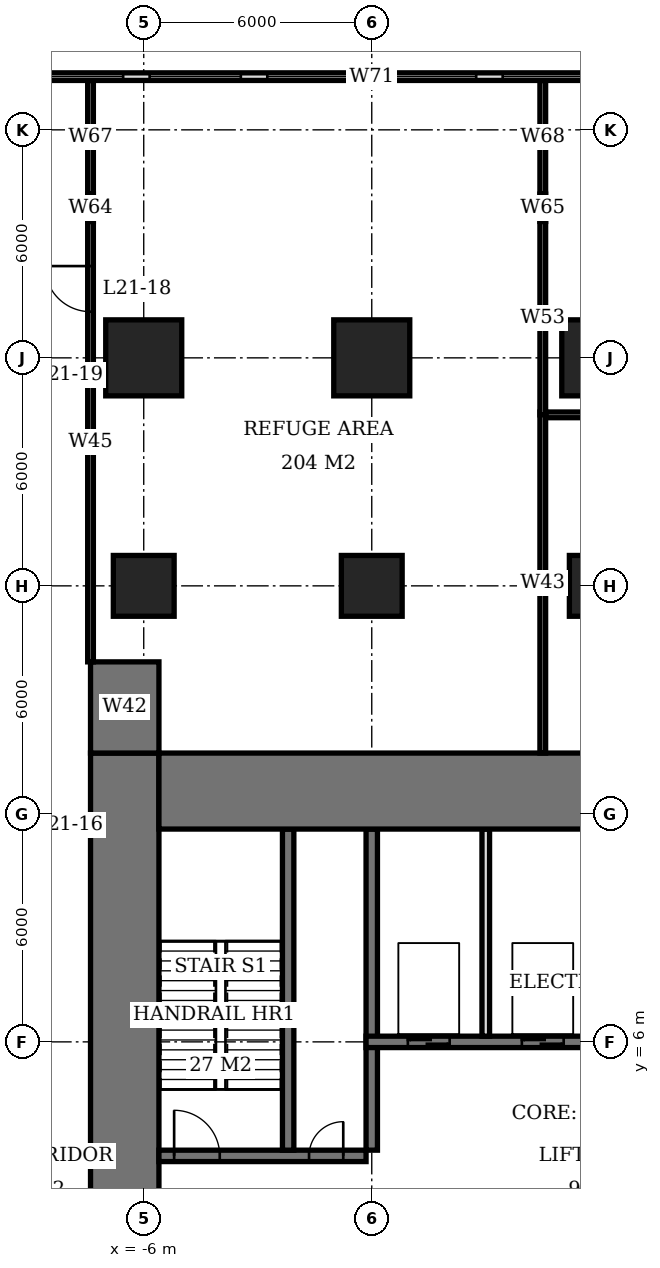
"""IFC4 building model, lengths in metres.
Left out: names, types, materials, properties, quantities, classifications, styles, units other than length and angle.
Written with IfcOpenShell. Run it as: python <this file> out.ifc"""

import sys

from ifc_helpers import new_model, si_unit, direction, frame, frame_2d, origin, origin_2d, place, context, subcontext, project, spatial, rectangle, extrude, element, fill, save


model = new_model("IFC4")
c1 = context("Model", 3, precision=1e-05, world=origin(), true_north=direction((0.0, 1.0)))
c2 = subcontext(c1, "Body", "Model", "MODEL_VIEW")
j1 = project(units=[si_unit("LENGTHUNIT", "METRE"), si_unit("PLANEANGLEUNIT", "RADIAN")], contexts=[c1])
p1 = place(None, origin())
s1 = spatial("IfcSite", under=j1, at=p1, CompositionType="ELEMENT")
p2 = place(p1, origin())
s2 = spatial("IfcBuilding", under=s1, at=p2, CompositionType="ELEMENT")
p3 = place(p2, frame((0.0, 0.0, 88.4)))
s3 = spatial("IfcBuildingStorey", under=s2, at=p3, CompositionType="ELEMENT", Elevation=88.4)
p4 = place(p3, frame((-6.0, 18.0, 0.0), z_axis=(0.0, 0.0, 1.0), x_axis=(1.0, 0.0, 0.0)))
e1 = element("IfcColumn", 1, at=p4, inside=s3, PredefinedType="COLUMN", context=c2, shape_type="SweptSolid", body=[
    extrude(rectangle(XDim=1.6, YDim=1.6, at=origin_2d()), origin(), (0.0, 0.0, 1.0), 5.4),
])
p5 = place(p3, frame((-6.0, 24.0, 0.0), z_axis=(0.0, 0.0, 1.0), x_axis=(1.0, 0.0, 0.0)))
e2 = element("IfcColumn", 2, at=p5, inside=s3, PredefinedType="COLUMN", context=c2, shape_type="SweptSolid", body=[
    extrude(rectangle(XDim=2.0, YDim=2.0, at=origin_2d()), origin(), (0.0, 0.0, 1.0), 5.4),
])
p6 = place(p3, frame((0.0, 18.0, 0.0), z_axis=(0.0, 0.0, 1.0), x_axis=(1.0, 0.0, 0.0)))
e3 = element("IfcColumn", 3, at=p6, inside=s3, PredefinedType="COLUMN", context=c2, shape_type="SweptSolid", body=[
    extrude(rectangle(XDim=1.6, YDim=1.6, at=origin_2d()), origin(), (0.0, 0.0, 1.0), 5.4),
])
p7 = place(p3, frame((0.0, 24.0, 0.0), z_axis=(0.0, 0.0, 1.0), x_axis=(1.0, 0.0, 0.0)))
e4 = element("IfcColumn", 4, at=p7, inside=s3, PredefinedType="COLUMN", context=c2, shape_type="SweptSolid", body=[
    extrude(rectangle(XDim=2.0, YDim=2.0, at=origin_2d()), origin(), (0.0, 0.0, 1.0), 5.4),
])
p8 = place(p3, frame((6.0, 18.0, 0.0), z_axis=(0.0, 0.0, 1.0), x_axis=(1.0, 0.0, 0.0)))
e5 = element("IfcColumn", 5, at=p8, inside=s3, PredefinedType="COLUMN", context=c2, shape_type="SweptSolid", body=[
    extrude(rectangle(XDim=1.6, YDim=1.6, at=origin_2d()), origin(), (0.0, 0.0, 1.0), 5.4),
])
p9 = place(p3, frame((6.0, 24.0, 0.0), z_axis=(0.0, 0.0, 1.0), x_axis=(1.0, 0.0, 0.0)))
e6 = element("IfcColumn", 6, at=p9, inside=s3, PredefinedType="COLUMN", context=c2, shape_type="SweptSolid", body=[
    extrude(rectangle(XDim=2.0, YDim=2.0, at=origin_2d()), origin(), (0.0, 0.0, 1.0), 5.4),
])
p10 = place(p3, frame((-5.6, 12.6, 0.0), z_axis=(0.0, 0.0, 1.0), x_axis=(1.0, 0.0, 0.0)))
e7 = element("IfcWall", 7, at=p10, inside=s3, PredefinedType="SHEAR", context=c2, shape_type="SweptSolid", body=[
    extrude(rectangle(XDim=23.2, YDim=2.0, at=frame_2d((11.6, 0.0))), origin(), (0.0, 0.0, 1.0), 5.4),
])
p11 = place(p3, frame((-6.5, -7.6, 0.0), z_axis=(0.0, 0.0, 1.0), x_axis=(0.0, 1.0, 0.0)))
e8 = element("IfcWall", 8, at=p11, inside=s3, PredefinedType="SHEAR", context=c2, shape_type="SweptSolid", body=[
    extrude(rectangle(XDim=21.2, YDim=1.8, at=frame_2d((10.6, 0.0))), origin(), (0.0, 0.0, 1.0), 5.4),
])
p12 = place(p11, frame((7.8, 0.0, 0.0)))
e9 = element("IfcOpeningElement", 9, at=p12, cuts=e8, PredefinedType="OPENING", context=c2, shape_type="SweptSolid", body=[
    extrude(rectangle(XDim=1.8, YDim=2.4, at=frame_2d((0.9, 1.2))), frame((0.0, 0.91, 0.0), z_axis=(0.0, -1.0, 0.0), x_axis=(1.0, 0.0, 0.0)), (0.0, 0.0, 1.0), 1.82),
])
p13 = place(p3, frame((-6.5, 13.6, 0.0), z_axis=(0.0, 0.0, 1.0), x_axis=(0.0, 1.0, 0.0)))
e10 = element("IfcWall", 10, at=p13, inside=s3, PredefinedType="SHEAR", context=c2, shape_type="SweptSolid", body=[
    extrude(rectangle(XDim=2.4, YDim=1.8, at=frame_2d((1.2, 0.0))), origin(), (0.0, 0.0, 1.0), 5.4),
])
p14 = place(p3, frame((-5.6, 3.0, 0.0), z_axis=(0.0, 0.0, 1.0), x_axis=(1.0, 0.0, 0.0)))
e11 = element("IfcWall", 11, at=p14, inside=s3, PredefinedType="SHEAR", context=c2, shape_type="SweptSolid", body=[
    extrude(rectangle(XDim=5.45, YDim=0.3, at=frame_2d((2.725, 0.0))), origin(), (0.0, 0.0, 1.0), 5.4),
])
p15 = place(p14, frame((0.4, 0.0, 0.0)))
e12 = element("IfcOpeningElement", 12, at=p15, cuts=e11, PredefinedType="OPENING", context=c2, shape_type="SweptSolid", body=[
    extrude(rectangle(XDim=1.2, YDim=2.1, at=frame_2d((0.6, 1.05))), frame((0.0, 0.16, 0.0), z_axis=(0.0, -1.0, 0.0), x_axis=(1.0, 0.0, 0.0)), (0.0, 0.0, 1.0), 0.32),
])
p16 = place(p14, frame((3.95, 0.0, 0.0)))
e13 = element("IfcOpeningElement", 13, at=p16, cuts=e11, PredefinedType="OPENING", context=c2, shape_type="SweptSolid", body=[
    extrude(rectangle(XDim=0.9, YDim=2.1, at=frame_2d((0.45, 1.05))), frame((0.0, 0.16, 0.0), z_axis=(0.0, -1.0, 0.0), x_axis=(1.0, 0.0, 0.0)), (0.0, 0.0, 1.0), 0.32),
])
p17 = place(p3, frame((-0.15, 6.0, 0.0), z_axis=(0.0, 0.0, 1.0), x_axis=(1.0, 0.0, 0.0)))
e14 = element("IfcWall", 14, at=p17, inside=s3, PredefinedType="SHEAR", context=c2, shape_type="SweptSolid", body=[
    extrude(rectangle(XDim=17.75, YDim=0.3, at=frame_2d((8.875, 0.0))), origin(), (0.0, 0.0, 1.0), 5.4),
])
p18 = place(p17, frame((13.15, 0.0, 0.0)))
e15 = element("IfcOpeningElement", 15, at=p18, cuts=e14, PredefinedType="OPENING", context=c2, shape_type="SweptSolid", body=[
    extrude(rectangle(XDim=0.9, YDim=2.1, at=frame_2d((0.45, 1.05))), frame((0.0, 0.16, 0.0), z_axis=(0.0, -1.0, 0.0), x_axis=(1.0, 0.0, 0.0)), (0.0, 0.0, 1.0), 0.32),
])
p19 = place(p17, frame((16.25, 0.0, 0.0)))
e16 = element("IfcOpeningElement", 16, at=p19, cuts=e14, PredefinedType="OPENING", context=c2, shape_type="SweptSolid", body=[
    extrude(rectangle(XDim=1.0, YDim=2.1, at=frame_2d((0.5, 1.05))), frame((0.0, 0.16, 0.0), z_axis=(0.0, -1.0, 0.0), x_axis=(1.0, 0.0, 0.0)), (0.0, 0.0, 1.0), 0.32),
])
p20 = place(p17, frame((7.25, 0.0, 0.0)))
e17 = element("IfcOpeningElement", 17, at=p20, cuts=e14, PredefinedType="OPENING", context=c2, shape_type="SweptSolid", body=[
    extrude(rectangle(XDim=1.0, YDim=2.1, at=frame_2d((0.5, 1.05))), frame((0.0, 0.16, 0.0), z_axis=(0.0, -1.0, 0.0), x_axis=(1.0, 0.0, 0.0)), (0.0, 0.0, 1.0), 0.32),
])
p21 = place(p17, frame((1.1, 0.0, 0.0)))
e18 = element("IfcOpeningElement", 18, at=p21, cuts=e14, PredefinedType="OPENING", context=c2, shape_type="SweptSolid", body=[
    extrude(rectangle(XDim=1.1, YDim=2.1, at=frame_2d((0.55, 1.05))), frame((0.0, 0.16, 0.0), z_axis=(0.0, -1.0, 0.0), x_axis=(1.0, 0.0, 0.0)), (0.0, 0.0, 1.0), 0.32),
])
p22 = place(p17, frame((4.1, 0.0, 0.0)))
e19 = element("IfcOpeningElement", 19, at=p22, cuts=e14, PredefinedType="OPENING", context=c2, shape_type="SweptSolid", body=[
    extrude(rectangle(XDim=1.1, YDim=2.1, at=frame_2d((0.55, 1.05))), frame((0.0, 0.16, 0.0), z_axis=(0.0, -1.0, 0.0), x_axis=(1.0, 0.0, 0.0)), (0.0, 0.0, 1.0), 0.32),
])
for number, where, z_axis, x_axis in (
    (20, (0.0, 3.15, 0.0), (0.0, 0.0, 1.0), (0.0, 1.0, 0.0)),
    (21, (-2.2, 3.15, 0.0), (0.0, 0.0, 1.0), (0.0, 1.0, 0.0)),
):
    element("IfcWall", number, at=place(p3, frame(where, z_axis=z_axis, x_axis=x_axis)), inside=s3, PredefinedType="SHEAR", context=c2, shape_type="SweptSolid", body=[
        extrude(rectangle(XDim=8.45, YDim=0.3, at=frame_2d((4.225, 0.0))), origin(), (0.0, 0.0, 1.0), 5.4),
    ])
p23 = place(p3, frame((3.0, 6.15, 0.0), z_axis=(0.0, 0.0, 1.0), x_axis=(0.0, 1.0, 0.0)))
e22 = element("IfcWall", 22, at=p23, inside=s3, PredefinedType="SOLIDWALL", context=c2, shape_type="SweptSolid", body=[
    extrude(rectangle(XDim=5.45, YDim=0.2, at=frame_2d((2.725, 0.0))), origin(), (0.0, 0.0, 1.0), 5.4),
])
p24 = place(p3, frame((18.58, 31.4, 0.0), z_axis=(0.0, 0.0, 1.0), x_axis=(-1.0, 0.0, 0.0)))
e23 = element("IfcWall", 23, at=p24, inside=s3, PredefinedType="USERDEFINED", context=c2, shape_type="SweptSolid", body=[
    extrude(rectangle(XDim=37.16, YDim=0.2, at=frame_2d((18.58, 0.0))), origin(), (0.0, 0.0, 1.0), 5.4),
])
p25 = place(p24, frame((0.348, 0.0, 0.6)))
e24 = element("IfcOpeningElement", 24, at=p25, cuts=e23, PredefinedType="OPENING", context=c2, shape_type="SweptSolid", body=[
    extrude(rectangle(XDim=2.4, YDim=3.0, at=frame_2d((1.2, 1.5))), frame((0.0, 0.11, 0.0), z_axis=(0.0, -1.0, 0.0), x_axis=(1.0, 0.0, 0.0)), (0.0, 0.0, 1.0), 0.22),
])
p26 = place(p24, frame((3.445, 0.0, 0.6)))
e25 = element("IfcOpeningElement", 25, at=p26, cuts=e23, PredefinedType="OPENING", context=c2, shape_type="SweptSolid", body=[
    extrude(rectangle(XDim=2.4, YDim=3.0, at=frame_2d((1.2, 1.5))), frame((0.0, 0.11, 0.0), z_axis=(0.0, -1.0, 0.0), x_axis=(1.0, 0.0, 0.0)), (0.0, 0.0, 1.0), 0.22),
])
p27 = place(p24, frame((6.542, 0.0, 0.6)))
e26 = element("IfcOpeningElement", 26, at=p27, cuts=e23, PredefinedType="OPENING", context=c2, shape_type="SweptSolid", body=[
    extrude(rectangle(XDim=2.4, YDim=3.0, at=frame_2d((1.2, 1.5))), frame((0.0, 0.11, 0.0), z_axis=(0.0, -1.0, 0.0), x_axis=(1.0, 0.0, 0.0)), (0.0, 0.0, 1.0), 0.22),
])
p28 = place(p24, frame((9.638, 0.0, 0.6)))
e27 = element("IfcOpeningElement", 27, at=p28, cuts=e23, PredefinedType="OPENING", context=c2, shape_type="SweptSolid", body=[
    extrude(rectangle(XDim=2.4, YDim=3.0, at=frame_2d((1.2, 1.5))), frame((0.0, 0.11, 0.0), z_axis=(0.0, -1.0, 0.0), x_axis=(1.0, 0.0, 0.0)), (0.0, 0.0, 1.0), 0.22),
])
p29 = place(p24, frame((12.735, 0.0, 0.6)))
e28 = element("IfcOpeningElement", 28, at=p29, cuts=e23, PredefinedType="OPENING", context=c2, shape_type="SweptSolid", body=[
    extrude(rectangle(XDim=2.4, YDim=3.0, at=frame_2d((1.2, 1.5))), frame((0.0, 0.11, 0.0), z_axis=(0.0, -1.0, 0.0), x_axis=(1.0, 0.0, 0.0)), (0.0, 0.0, 1.0), 0.22),
])
p30 = place(p24, frame((15.832, 0.0, 0.6)))
e29 = element("IfcOpeningElement", 29, at=p30, cuts=e23, PredefinedType="OPENING", context=c2, shape_type="SweptSolid", body=[
    extrude(rectangle(XDim=2.4, YDim=3.0, at=frame_2d((1.2, 1.5))), frame((0.0, 0.11, 0.0), z_axis=(0.0, -1.0, 0.0), x_axis=(1.0, 0.0, 0.0)), (0.0, 0.0, 1.0), 0.22),
])
p31 = place(p24, frame((18.928, 0.0, 0.6)))
e30 = element("IfcOpeningElement", 30, at=p31, cuts=e23, PredefinedType="OPENING", context=c2, shape_type="SweptSolid", body=[
    extrude(rectangle(XDim=2.4, YDim=3.0, at=frame_2d((1.2, 1.5))), frame((0.0, 0.11, 0.0), z_axis=(0.0, -1.0, 0.0), x_axis=(1.0, 0.0, 0.0)), (0.0, 0.0, 1.0), 0.22),
])
p32 = place(p24, frame((22.025, 0.0, 0.6)))
e31 = element("IfcOpeningElement", 31, at=p32, cuts=e23, PredefinedType="OPENING", context=c2, shape_type="SweptSolid", body=[
    extrude(rectangle(XDim=2.4, YDim=3.0, at=frame_2d((1.2, 1.5))), frame((0.0, 0.11, 0.0), z_axis=(0.0, -1.0, 0.0), x_axis=(1.0, 0.0, 0.0)), (0.0, 0.0, 1.0), 0.22),
])
p33 = place(p24, frame((25.122, 0.0, 0.6)))
e32 = element("IfcOpeningElement", 32, at=p33, cuts=e23, PredefinedType="OPENING", context=c2, shape_type="SweptSolid", body=[
    extrude(rectangle(XDim=2.4, YDim=3.0, at=frame_2d((1.2, 1.5))), frame((0.0, 0.11, 0.0), z_axis=(0.0, -1.0, 0.0), x_axis=(1.0, 0.0, 0.0)), (0.0, 0.0, 1.0), 0.22),
])
p34 = place(p24, frame((28.218, 0.0, 0.6)))
e33 = element("IfcOpeningElement", 33, at=p34, cuts=e23, PredefinedType="OPENING", context=c2, shape_type="SweptSolid", body=[
    extrude(rectangle(XDim=2.4, YDim=3.0, at=frame_2d((1.2, 1.5))), frame((0.0, 0.11, 0.0), z_axis=(0.0, -1.0, 0.0), x_axis=(1.0, 0.0, 0.0)), (0.0, 0.0, 1.0), 0.22),
])
p35 = place(p24, frame((31.315, 0.0, 0.6)))
e34 = element("IfcOpeningElement", 34, at=p35, cuts=e23, PredefinedType="OPENING", context=c2, shape_type="SweptSolid", body=[
    extrude(rectangle(XDim=2.4, YDim=3.0, at=frame_2d((1.2, 1.5))), frame((0.0, 0.11, 0.0), z_axis=(0.0, -1.0, 0.0), x_axis=(1.0, 0.0, 0.0)), (0.0, 0.0, 1.0), 0.22),
])
p36 = place(p24, frame((34.412, 0.0, 0.6)))
e35 = element("IfcOpeningElement", 35, at=p36, cuts=e23, PredefinedType="OPENING", context=c2, shape_type="SweptSolid", body=[
    extrude(rectangle(XDim=2.4, YDim=3.0, at=frame_2d((1.2, 1.5))), frame((0.0, 0.11, 0.0), z_axis=(0.0, -1.0, 0.0), x_axis=(1.0, 0.0, 0.0)), (0.0, 0.0, 1.0), 0.22),
])
p37 = place(p3, frame((-7.4, 16.0, 0.0), z_axis=(0.0, 0.0, 1.0), x_axis=(0.0, 1.0, 0.0)))
e36 = element("IfcWall", 36, at=p37, inside=s3, PredefinedType="PARTITIONING", context=c2, shape_type="SweptSolid", body=[
    extrude(rectangle(XDim=11.59, YDim=0.15, at=frame_2d((5.795, 0.0))), origin(), (0.0, 0.0, 1.0), 5.15),
])
p38 = place(p37, frame((9.215, 0.0, 0.0)))
e37 = element("IfcOpeningElement", 37, at=p38, cuts=e36, PredefinedType="OPENING", context=c2, shape_type="SweptSolid", body=[
    extrude(rectangle(XDim=1.2, YDim=2.4, at=frame_2d((0.6, 1.2))), frame((0.0, 0.085, 0.0), z_axis=(0.0, -1.0, 0.0), x_axis=(1.0, 0.0, 0.0)), (0.0, 0.0, 1.0), 0.17),
])
p39 = place(p3, frame((-7.4, 27.59, 0.0), z_axis=(0.0, 0.0, 1.0), x_axis=(0.0, 1.0, 0.0)))
e38 = element("IfcWall", 38, at=p39, inside=s3, PredefinedType="PARTITIONING", context=c2, shape_type="SweptSolid", body=[
    extrude(rectangle(XDim=0.72, YDim=0.15, at=frame_2d((0.36, 0.0))), origin(), (0.0, 0.0, 1.0), 4.15),
])
p40 = place(p3, frame((-7.4, 28.31, 0.0), z_axis=(0.0, 0.0, 1.0), x_axis=(0.0, 1.0, 0.0)))
e39 = element("IfcWall", 39, at=p40, inside=s3, PredefinedType="PARTITIONING", context=c2, shape_type="SweptSolid", body=[
    extrude(rectangle(XDim=2.99, YDim=0.15, at=frame_2d((1.495, 0.0))), origin(), (0.0, 0.0, 1.0), 5.15),
])
p41 = place(p3, frame((4.5, 13.6, 0.0), z_axis=(0.0, 0.0, 1.0), x_axis=(0.0, 1.0, 0.0)))
e40 = element("IfcWall", 40, at=p41, inside=s3, PredefinedType="PARTITIONING", context=c2, shape_type="SweptSolid", body=[
    extrude(rectangle(XDim=8.975, YDim=0.15, at=frame_2d((4.487, 0.0))), origin(), (0.0, 0.0, 1.0), 5.15),
])
p42 = place(p3, frame((4.5, 22.5, 0.0), z_axis=(0.0, 0.0, 1.0), x_axis=(0.0, 1.0, 0.0)))
e41 = element("IfcWall", 41, at=p42, inside=s3, PredefinedType="PARTITIONING", context=c2, shape_type="SweptSolid", body=[
    extrude(rectangle(XDim=5.09, YDim=0.15, at=frame_2d((2.545, 0.0))), origin(), (0.0, 0.0, 1.0), 5.15),
])
p43 = place(p3, frame((4.5, 27.59, 0.0), z_axis=(0.0, 0.0, 1.0), x_axis=(0.0, 1.0, 0.0)))
e42 = element("IfcWall", 42, at=p43, inside=s3, PredefinedType="PARTITIONING", context=c2, shape_type="SweptSolid", body=[
    extrude(rectangle(XDim=0.72, YDim=0.15, at=frame_2d((0.36, 0.0))), origin(), (0.0, 0.0, 1.0), 4.15),
])
p44 = place(p3, frame((4.5, 28.31, 0.0), z_axis=(0.0, 0.0, 1.0), x_axis=(0.0, 1.0, 0.0)))
e43 = element("IfcWall", 43, at=p44, inside=s3, PredefinedType="PARTITIONING", context=c2, shape_type="SweptSolid", body=[
    extrude(rectangle(XDim=2.99, YDim=0.15, at=frame_2d((1.495, 0.0))), origin(), (0.0, 0.0, 1.0), 5.15),
])
p45 = place(p3, frame((4.575, 22.5, 0.0), z_axis=(0.0, 0.0, 1.0), x_axis=(1.0, 0.0, 0.0)))
e44 = element("IfcWall", 44, at=p45, inside=s3, PredefinedType="PARTITIONING", context=c2, shape_type="SweptSolid", body=[
    extrude(rectangle(XDim=14.975, YDim=0.15, at=frame_2d((7.488, 0.0))), origin(), (0.0, 0.0, 1.0), 5.15),
])
p46 = place(p29, origin())
e45 = element("IfcWindow", 45, at=p46, inside=s3, PartitioningType="SINGLE_PANEL", PredefinedType="USERDEFINED", context=c2, shape_type="SweptSolid", body=[
    extrude(rectangle(XDim=2.4, YDim=3.0, at=frame_2d((1.2, 1.5))), frame((0.0, 0.03, 0.0), z_axis=(0.0, -1.0, 0.0), x_axis=(1.0, 0.0, 0.0)), (0.0, 0.0, 1.0), 0.06),
])
fill(e28, e45)
p47 = place(p30, origin())
e46 = element("IfcWindow", 46, at=p47, inside=s3, PartitioningType="SINGLE_PANEL", PredefinedType="USERDEFINED", context=c2, shape_type="SweptSolid", body=[
    extrude(rectangle(XDim=2.4, YDim=3.0, at=frame_2d((1.2, 1.5))), frame((0.0, 0.03, 0.0), z_axis=(0.0, -1.0, 0.0), x_axis=(1.0, 0.0, 0.0)), (0.0, 0.0, 1.0), 0.06),
])
fill(e29, e46)
p48 = place(p31, origin())
e47 = element("IfcWindow", 47, at=p48, inside=s3, PartitioningType="SINGLE_PANEL", PredefinedType="USERDEFINED", context=c2, shape_type="SweptSolid", body=[
    extrude(rectangle(XDim=2.4, YDim=3.0, at=frame_2d((1.2, 1.5))), frame((0.0, 0.03, 0.0), z_axis=(0.0, -1.0, 0.0), x_axis=(1.0, 0.0, 0.0)), (0.0, 0.0, 1.0), 0.06),
])
fill(e30, e47)
p49 = place(p32, origin())
e48 = element("IfcWindow", 48, at=p49, inside=s3, PartitioningType="SINGLE_PANEL", PredefinedType="USERDEFINED", context=c2, shape_type="SweptSolid", body=[
    extrude(rectangle(XDim=2.4, YDim=3.0, at=frame_2d((1.2, 1.5))), frame((0.0, 0.03, 0.0), z_axis=(0.0, -1.0, 0.0), x_axis=(1.0, 0.0, 0.0)), (0.0, 0.0, 1.0), 0.06),
])
fill(e31, e48)
p50 = place(p33, origin())
e49 = element("IfcWindow", 49, at=p50, inside=s3, PartitioningType="SINGLE_PANEL", PredefinedType="USERDEFINED", context=c2, shape_type="SweptSolid", body=[
    extrude(rectangle(XDim=2.4, YDim=3.0, at=frame_2d((1.2, 1.5))), frame((0.0, 0.03, 0.0), z_axis=(0.0, -1.0, 0.0), x_axis=(1.0, 0.0, 0.0)), (0.0, 0.0, 1.0), 0.06),
])
fill(e32, e49)
p51 = place(p15, origin())
e50 = element("IfcDoor", 50, at=p51, inside=s3, OperationType="SINGLE_SWING_LEFT", PredefinedType="DOOR", context=c2, shape_type="SweptSolid", body=[
    extrude(rectangle(XDim=1.2, YDim=2.1, at=frame_2d((0.6, 1.05))), frame((0.0, 0.025, 0.0), z_axis=(0.0, -1.0, 0.0), x_axis=(1.0, 0.0, 0.0)), (0.0, 0.0, 1.0), 0.05),
])
fill(e12, e50)
p52 = place(p16, origin())
e51 = element("IfcDoor", 51, at=p52, inside=s3, OperationType="SINGLE_SWING_RIGHT", PredefinedType="DOOR", context=c2, shape_type="SweptSolid", body=[
    extrude(rectangle(XDim=0.9, YDim=2.1, at=frame_2d((0.45, 1.05))), frame((0.0, 0.025, 0.0), z_axis=(0.0, -1.0, 0.0), x_axis=(1.0, 0.0, 0.0)), (0.0, 0.0, 1.0), 0.05),
])
fill(e13, e51)
p53 = place(p21, origin())
e52 = element("IfcDoor", 52, at=p53, inside=s3, OperationType="DOUBLE_DOOR_SLIDING", PredefinedType="USERDEFINED", context=c2, shape_type="SweptSolid", body=[
    extrude(rectangle(XDim=1.1, YDim=2.1, at=frame_2d((0.55, 1.05))), frame((0.0, 0.025, 0.0), z_axis=(0.0, -1.0, 0.0), x_axis=(1.0, 0.0, 0.0)), (0.0, 0.0, 1.0), 0.05),
])
fill(e18, e52)
p54 = place(p22, origin())
e53 = element("IfcDoor", 53, at=p54, inside=s3, OperationType="DOUBLE_DOOR_SLIDING", PredefinedType="USERDEFINED", context=c2, shape_type="SweptSolid", body=[
    extrude(rectangle(XDim=1.1, YDim=2.1, at=frame_2d((0.55, 1.05))), frame((0.0, 0.025, 0.0), z_axis=(0.0, -1.0, 0.0), x_axis=(1.0, 0.0, 0.0)), (0.0, 0.0, 1.0), 0.05),
])
fill(e19, e53)
p55 = place(p38, origin())
e54 = element("IfcDoor", 54, at=p55, inside=s3, OperationType="SINGLE_SWING_RIGHT", PredefinedType="DOOR", context=c2, shape_type="SweptSolid", body=[
    extrude(rectangle(XDim=1.2, YDim=2.4, at=frame_2d((0.6, 1.2))), frame((0.0, 0.025, 0.0), z_axis=(0.0, -1.0, 0.0), x_axis=(1.0, 0.0, 0.0)), (0.0, 0.0, 1.0), 0.05),
])
fill(e37, e54)
save(model, sys.argv[1])
